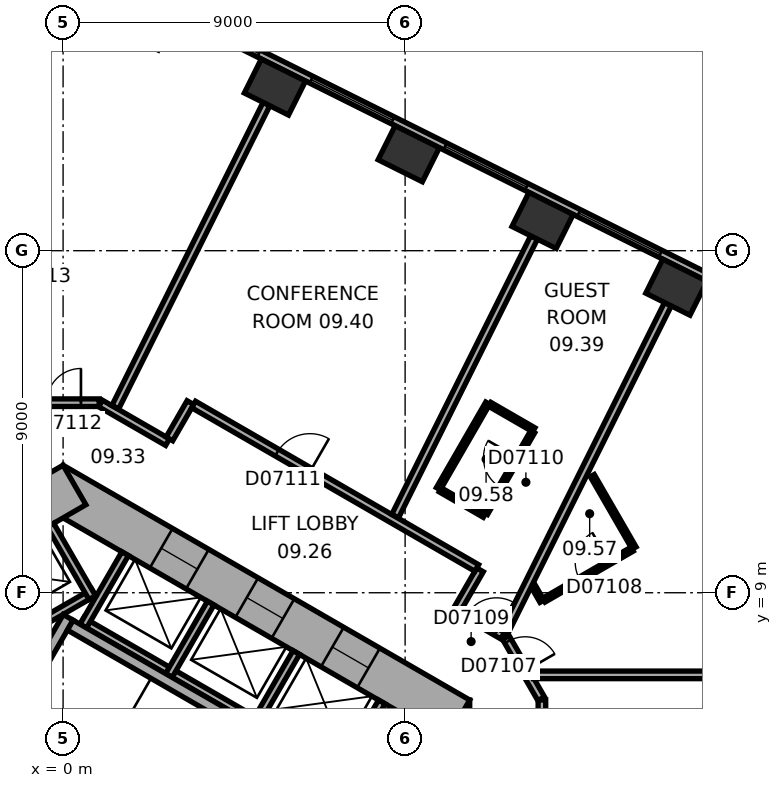
"""IFC4 building model, lengths in metres.
Left out: names, types, materials, properties, quantities, classifications, styles, units other than length and angle.
Written with IfcOpenShell. Run it as: python <this file> out.ifc"""

import sys

from ifc_helpers import new_model, si_unit, direction, frame, frame_2d, origin, origin_2d, place, context, subcontext, project, spatial, rectangle, extrude, element, fill, save


model = new_model("IFC4")
c1 = context("Model", 3, precision=1e-05, world=origin(), true_north=direction((0.0, 1.0)))
c2 = subcontext(c1, "Body", "Model", "MODEL_VIEW")
j1 = project(units=[si_unit("LENGTHUNIT", "METRE"), si_unit("PLANEANGLEUNIT", "RADIAN")], contexts=[c1])
p1 = place(None, origin())
s1 = spatial("IfcSite", under=j1, at=p1, CompositionType="ELEMENT")
p2 = place(p1, origin())
s2 = spatial("IfcBuilding", under=s1, at=p2, CompositionType="ELEMENT")
p3 = place(p2, frame((0.0, 0.0, 50.6)))
s3 = spatial("IfcBuildingStorey", under=s2, at=p3, CompositionType="ELEMENT", Elevation=50.6)
for number, where, z_axis, x_axis in (
    (1, (16.138, 17.04, 0.0), (0.0, 0.0, 1.0), (-0.895, 0.446, 0.0)),
    (2, (12.616, 18.795, 0.0), (0.0, 0.0, 1.0), (-0.895, 0.446, 0.0)),
    (3, (9.095, 20.551, 0.0), (0.0, 0.0, 1.0), (-0.895, 0.446, 0.0)),
    (4, (5.574, 22.306, 0.0), (0.0, 0.0, 1.0), (-0.895, 0.446, 0.0)),
):
    element("IfcColumn", number, at=place(p3, frame(where, z_axis=z_axis, x_axis=x_axis)), inside=s3, PredefinedType="COLUMN", context=c2, shape_type="SweptSolid", body=[
        extrude(rectangle(XDim=1.3, YDim=1.0, at=origin_2d()), origin(), (0.0, 0.0, 1.0), 3.3),
    ])
p4 = place(p3, frame((10.1, -6.177, 0.0), z_axis=(0.0, 0.0, 1.0), x_axis=(0.0, 1.0, 0.0)))
e5 = element("IfcWall", 5, at=p4, inside=s3, PredefinedType="SHEAR", context=c2, shape_type="SweptSolid", body=[
    extrude(rectangle(XDim=12.355, YDim=1.2, at=frame_2d((6.177, 0.0))), origin(), (0.0, 0.0, 1.0), 3.3),
])
p5 = place(p4, frame((6.378, 0.0, 0.0)))
e6 = element("IfcOpeningElement", 6, at=p5, cuts=e5, PredefinedType="OPENING", context=c2, shape_type="SweptSolid", body=[
    extrude(rectangle(XDim=1.5, YDim=2.1, at=frame_2d((0.75, 1.05))), frame((0.0, 0.61, 0.0), z_axis=(0.0, -1.0, 0.0), x_axis=(1.0, 0.0, 0.0)), (0.0, 0.0, 1.0), 1.22),
])
p6 = place(p4, frame((1.828, 0.0, 0.0)))
e7 = element("IfcOpeningElement", 7, at=p6, cuts=e5, PredefinedType="OPENING", context=c2, shape_type="SweptSolid", body=[
    extrude(rectangle(XDim=1.1, YDim=2.1, at=frame_2d((0.55, 1.05))), frame((0.0, 0.61, 0.0), z_axis=(0.0, -1.0, 0.0), x_axis=(1.0, 0.0, 0.0)), (0.0, 0.0, 1.0), 1.22),
])
p7 = place(p4, frame((4.427, 0.0, 0.0)))
e8 = element("IfcOpeningElement", 8, at=p7, cuts=e5, PredefinedType="OPENING", context=c2, shape_type="SweptSolid", body=[
    extrude(rectangle(XDim=1.1, YDim=2.1, at=frame_2d((0.55, 1.05))), frame((0.0, 0.61, 0.0), z_axis=(0.0, -1.0, 0.0), x_axis=(1.0, 0.0, 0.0)), (0.0, 0.0, 1.0), 1.22),
])
p8 = place(p3, frame((10.4, 5.658, 0.0), z_axis=(0.0, 0.0, 1.0), x_axis=(-0.866021384402, 0.500006961711, 0.0)))
e9 = element("IfcWall", 9, at=p8, inside=s3, PredefinedType="SHEAR", context=c2, shape_type="SweptSolid", body=[
    extrude(rectangle(XDim=12.355, YDim=1.2, at=frame_2d((6.178, 0.0))), origin(), (0.0, 0.0, 1.0), 3.3),
])
p9 = place(p8, frame((2.728, 0.0, 0.0)))
e10 = element("IfcOpeningElement", 10, at=p9, cuts=e9, PredefinedType="OPENING", context=c2, shape_type="SweptSolid", body=[
    extrude(rectangle(XDim=1.1, YDim=2.1, at=frame_2d((0.55, 1.05))), frame((0.0, 0.61, 0.0), z_axis=(0.0, -1.0, 0.0), x_axis=(1.0, 0.0, 0.0)), (0.0, 0.0, 1.0), 1.22),
])
p10 = place(p8, frame((5.328, 0.0, 0.0)))
e11 = element("IfcOpeningElement", 11, at=p10, cuts=e9, PredefinedType="OPENING", context=c2, shape_type="SweptSolid", body=[
    extrude(rectangle(XDim=1.1, YDim=2.1, at=frame_2d((0.55, 1.05))), frame((0.0, 0.61, 0.0), z_axis=(0.0, -1.0, 0.0), x_axis=(1.0, 0.0, 0.0)), (0.0, 0.0, 1.0), 1.22),
])
p11 = place(p8, frame((7.928, 0.0, 0.0)))
e12 = element("IfcOpeningElement", 12, at=p11, cuts=e9, PredefinedType="OPENING", context=c2, shape_type="SweptSolid", body=[
    extrude(rectangle(XDim=1.1, YDim=2.1, at=frame_2d((0.55, 1.05))), frame((0.0, 0.61, 0.0), z_axis=(0.0, -1.0, 0.0), x_axis=(1.0, 0.0, 0.0)), (0.0, 0.0, 1.0), 1.22),
])
p12 = place(p3, frame((0.3, 11.836, 0.0), z_axis=(0.0, 0.0, 1.0), x_axis=(-0.866021384402, -0.500006961711, 0.0)))
e13 = element("IfcWall", 13, at=p12, inside=s3, PredefinedType="SHEAR", context=c2, shape_type="SweptSolid", body=[
    extrude(rectangle(XDim=12.355, YDim=1.2, at=frame_2d((6.178, 0.0))), origin(), (0.0, 0.0, 1.0), 3.3),
])
p13 = place(p12, frame((6.378, 0.0, 0.0)))
e14 = element("IfcOpeningElement", 14, at=p13, cuts=e13, PredefinedType="OPENING", context=c2, shape_type="SweptSolid", body=[
    extrude(rectangle(XDim=1.5, YDim=2.1, at=frame_2d((0.75, 1.05))), frame((0.0, 0.61, 0.0), z_axis=(0.0, -1.0, 0.0), x_axis=(1.0, 0.0, 0.0)), (0.0, 0.0, 1.0), 1.22),
])
p14 = place(p12, frame((1.828, 0.0, 0.0)))
e15 = element("IfcOpeningElement", 15, at=p14, cuts=e13, PredefinedType="OPENING", context=c2, shape_type="SweptSolid", body=[
    extrude(rectangle(XDim=1.1, YDim=2.1, at=frame_2d((0.55, 1.05))), frame((0.0, 0.61, 0.0), z_axis=(0.0, -1.0, 0.0), x_axis=(1.0, 0.0, 0.0)), (0.0, 0.0, 1.0), 1.22),
])
p15 = place(p3, frame((20.63, 15.47, 0.0), z_axis=(0.0, 0.0, 1.0), x_axis=(-0.894934518609, 0.446197498203, 0.0)))
e16 = element("IfcWall", 16, at=p15, inside=s3, PredefinedType="STANDARD", context=c2, shape_type="SweptSolid", body=[
    extrude(rectangle(XDim=21.246, YDim=0.2, at=frame_2d((10.623, 0.0))), origin(), (0.0, 0.0, 1.0), 3.3),
])
p16 = place(p15, frame((1.553, 0.0, 0.8)))
e17 = element("IfcOpeningElement", 17, at=p16, cuts=e16, PredefinedType="OPENING", context=c2, shape_type="SweptSolid", body=[
    extrude(rectangle(XDim=2.4, YDim=1.7, at=frame_2d((1.2, 0.85))), frame((0.0, 0.11, 0.0), z_axis=(0.0, -1.0, 0.0), x_axis=(1.0, 0.0, 0.0)), (0.0, 0.0, 1.0), 0.22),
])
p17 = place(p15, frame((5.488, 0.0, 0.8)))
e18 = element("IfcOpeningElement", 18, at=p17, cuts=e16, PredefinedType="OPENING", context=c2, shape_type="SweptSolid", body=[
    extrude(rectangle(XDim=2.4, YDim=1.7, at=frame_2d((1.2, 0.85))), frame((0.0, 0.11, 0.0), z_axis=(0.0, -1.0, 0.0), x_axis=(1.0, 0.0, 0.0)), (0.0, 0.0, 1.0), 0.22),
])
p18 = place(p15, frame((9.422, 0.0, 0.8)))
e19 = element("IfcOpeningElement", 19, at=p18, cuts=e16, PredefinedType="OPENING", context=c2, shape_type="SweptSolid", body=[
    extrude(rectangle(XDim=2.4, YDim=1.7, at=frame_2d((1.2, 0.85))), frame((0.0, 0.11, 0.0), z_axis=(0.0, -1.0, 0.0), x_axis=(1.0, 0.0, 0.0)), (0.0, 0.0, 1.0), 0.22),
])
p19 = place(p15, frame((13.357, 0.0, 0.8)))
e20 = element("IfcOpeningElement", 20, at=p19, cuts=e16, PredefinedType="OPENING", context=c2, shape_type="SweptSolid", body=[
    extrude(rectangle(XDim=2.4, YDim=1.7, at=frame_2d((1.2, 0.85))), frame((0.0, 0.11, 0.0), z_axis=(0.0, -1.0, 0.0), x_axis=(1.0, 0.0, 0.0)), (0.0, 0.0, 1.0), 0.22),
])
p20 = place(p15, frame((17.292, 0.0, 0.8)))
e21 = element("IfcOpeningElement", 21, at=p20, cuts=e16, PredefinedType="OPENING", context=c2, shape_type="SweptSolid", body=[
    extrude(rectangle(XDim=2.4, YDim=1.7, at=frame_2d((1.2, 0.85))), frame((0.0, 0.11, 0.0), z_axis=(0.0, -1.0, 0.0), x_axis=(1.0, 0.0, 0.0)), (0.0, 0.0, 1.0), 0.22),
])
p21 = place(p3, frame((7.424, 4.259, 0.0), z_axis=(0.0, 0.0, 1.0), x_axis=(-0.866026010844, 0.49999894854, 0.0)))
e22 = element("IfcWall", 22, at=p21, inside=s3, PredefinedType="PARTITIONING", context=c2, shape_type="SweptSolid", body=[
    extrude(rectangle(XDim=8.0, YDim=0.2, at=frame_2d((4.0, 0.0))), origin(), (0.0, 0.0, 1.0), 3.05),
])
for number, where, z_axis, x_axis in (
    (23, (7.287, 4.222, 0.0), (0.0, 0.0, 1.0), (0.5, 0.866, 0.0)),
    (24, (5.036, 5.522, 0.0), (0.0, 0.0, 1.0), (0.5, 0.866, 0.0)),
    (25, (2.784, 6.822, 0.0), (0.0, 0.0, 1.0), (0.5, 0.866, 0.0)),
    (26, (0.532, 8.122, 0.0), (0.0, 0.0, 1.0), (0.5, 0.866, 0.0)),
):
    element("IfcWall", number, at=place(p3, frame(where, z_axis=z_axis, x_axis=x_axis)), inside=s3, PredefinedType="PARTITIONING", context=c2, shape_type="SweptSolid", body=[
        extrude(rectangle(XDim=2.2, YDim=0.2, at=frame_2d((1.1, 0.0))), origin(), (0.0, 0.0, 1.0), 3.05),
    ])
p22 = place(p3, frame((0.803, 9.009, 0.0), z_axis=(0.0, 0.0, 1.0), x_axis=(-0.866028230842, -0.499995103361, 0.0)))
e27 = element("IfcWall", 27, at=p22, inside=s3, PredefinedType="PARTITIONING", context=c2, shape_type="SweptSolid", body=[
    extrude(rectangle(XDim=5.4, YDim=0.2, at=frame_2d((2.7, 0.0))), origin(), (0.0, 0.0, 1.0), 3.05),
])
p23 = place(p3, frame((0.767, 8.872, 0.0), z_axis=(0.0, 0.0, 1.0), x_axis=(-0.499994660107, 0.866028486751, 0.0)))
e28 = element("IfcWall", 28, at=p23, inside=s3, PredefinedType="PARTITIONING", context=c2, shape_type="SweptSolid", body=[
    extrude(rectangle(XDim=2.2, YDim=0.2, at=frame_2d((1.1, 0.0))), origin(), (0.0, 0.0, 1.0), 3.05),
])
p24 = place(p3, frame((-2.216, 4.282, 0.0), z_axis=(0.0, 0.0, 1.0), x_axis=(0.499977259774, 0.866038532462, 0.0)))
e29 = element("IfcWall", 29, at=p24, inside=s3, PredefinedType="SHEAR", context=c2, shape_type="SweptSolid", body=[
    extrude(rectangle(XDim=4.7, YDim=0.3, at=frame_2d((2.35, 0.0))), origin(), (0.0, 0.0, 1.0), 3.05),
])
p25 = place(p3, frame((6.303, 4.617, 0.0), z_axis=(0.0, 0.0, 1.0), x_axis=(-0.866027801685, 0.499995846692, 0.0)))
e30 = element("IfcWall", 30, at=p25, inside=s3, PredefinedType="SHEAR", context=c2, shape_type="SweptSolid", body=[
    extrude(rectangle(XDim=7.06, YDim=0.3, at=frame_2d((3.53, 0.0))), origin(), (0.0, 0.0, 1.0), 3.05),
])
p26 = place(p3, frame((0.95, 14.001, 0.0), z_axis=(0.0, 0.0, 1.0), x_axis=(-1.0, 0.0, 0.0)))
e31 = element("IfcWall", 31, at=p26, inside=s3, PredefinedType="PARTITIONING", context=c2, shape_type="SweptSolid", body=[
    extrude(rectangle(XDim=1.86, YDim=0.2, at=frame_2d((0.93, 0.0))), origin(), (0.0, 0.0, 1.0), 3.05),
])
p27 = place(p26, frame((0.48, 0.0, 0.0)))
e32 = element("IfcOpeningElement", 32, at=p27, cuts=e31, PredefinedType="OPENING", context=c2, shape_type="SweptSolid", body=[
    extrude(rectangle(XDim=0.9, YDim=2.1, at=frame_2d((0.45, 1.05))), frame((0.0, 0.11, 0.0), z_axis=(0.0, -1.0, 0.0), x_axis=(1.0, 0.0, 0.0)), (0.0, 0.0, 1.0), 0.22),
])
p28 = place(p3, frame((2.748, 12.962, 0.0), z_axis=(0.0, 0.0, 1.0), x_axis=(-0.866013897511, 0.50001992892, 0.0)))
e33 = element("IfcWall", 33, at=p28, inside=s3, PredefinedType="PARTITIONING", context=c2, shape_type="SweptSolid", body=[
    extrude(rectangle(XDim=2.037, YDim=0.2, at=frame_2d((1.018, 0.0))), origin(), (0.0, 0.0, 1.0), 3.05),
])
p29 = place(p3, frame((3.349, 14.002, 0.0), z_axis=(0.0, 0.0, 1.0), x_axis=(-0.500074377092, -0.865982457891, 0.0)))
e34 = element("IfcWall", 34, at=p29, inside=s3, PredefinedType="PARTITIONING", context=c2, shape_type="SweptSolid", body=[
    extrude(rectangle(XDim=1.101, YDim=0.2, at=frame_2d((0.55, 0.0))), origin(), (0.0, 0.0, 1.0), 3.05),
])
p30 = place(p3, frame((5.351, 21.859, 0.0), z_axis=(0.0, 0.0, 1.0), x_axis=(-0.446205309328, -0.894930624086, 0.0)))
e35 = element("IfcWall", 35, at=p30, inside=s3, PredefinedType="PARTITIONING", context=c2, shape_type="SweptSolid", body=[
    extrude(rectangle(XDim=8.913, YDim=0.2, at=frame_2d((4.457, 0.0))), origin(), (0.0, 0.0, 1.0), 2.6),
])
p31 = place(p3, frame((9.875, 11.736, 0.0), z_axis=(0.0, 0.0, 1.0), x_axis=(0.499936506574, 0.866062058628, 0.0)))
e36 = element("IfcWall", 36, at=p31, inside=s3, PredefinedType="PARTITIONING", context=c2, shape_type="SweptSolid", body=[
    extrude(rectangle(XDim=2.6, YDim=0.12, at=frame_2d((1.3, 0.0))), origin(), (0.0, 0.0, 1.0), 3.05),
])
p32 = place(p3, frame((10.371, 8.561, 0.0), z_axis=(0.0, 0.0, 1.0), x_axis=(0.499986357472, 0.866033280158, 0.0)))
e37 = element("IfcWall", 37, at=p32, inside=s3, PredefinedType="PARTITIONING", context=c2, shape_type="SweptSolid", body=[
    extrude(rectangle(XDim=1.201, YDim=0.2, at=frame_2d((0.601, 0.0))), origin(), (0.0, 0.0, 1.0), 3.05),
])
p33 = place(p3, frame((10.885, 9.652, 0.0), z_axis=(0.0, 0.0, 1.0), x_axis=(-0.866033868542, 0.499985338323, 0.0)))
e38 = element("IfcWall", 38, at=p33, inside=s3, PredefinedType="PARTITIONING", context=c2, shape_type="SweptSolid", body=[
    extrude(rectangle(XDim=8.602, YDim=0.2, at=frame_2d((4.301, 0.0))), origin(), (0.0, 0.0, 1.0), 3.05),
])
p34 = place(p33, frame((5.069, 0.0, 0.0)))
e39 = element("IfcOpeningElement", 39, at=p34, cuts=e38, PredefinedType="OPENING", context=c2, shape_type="SweptSolid", body=[
    extrude(rectangle(XDim=1.0, YDim=2.1, at=frame_2d((0.5, 1.05))), frame((0.0, 0.11, 0.0), z_axis=(0.0, -1.0, 0.0), x_axis=(1.0, 0.0, 0.0)), (0.0, 0.0, 1.0), 0.22),
])
for number, where, z_axis, x_axis in (
    (40, (11.087, 11.036, 0.0), (0.0, 0.0, 1.0), (-0.866, 0.5, 0.0)),
    (41, (11.226, 13.958, 0.0), (0.0, 0.0, 1.0), (0.866, -0.5, 0.0)),
):
    element("IfcWall", number, at=place(p3, frame(where, z_axis=z_axis, x_axis=x_axis)), inside=s3, PredefinedType="PARTITIONING", context=c2, shape_type="SweptSolid", body=[
        extrude(rectangle(XDim=1.34, YDim=0.12, at=frame_2d((0.67, 0.0))), origin(), (0.0, 0.0, 1.0), 3.05),
    ])
p35 = place(p3, frame((11.566, 7.871, 0.0), z_axis=(0.0, 0.0, 1.0), x_axis=(-0.866004557827, 0.500036104519, 0.0)))
e42 = element("IfcWall", 42, at=p35, inside=s3, PredefinedType="PARTITIONING", context=c2, shape_type="SweptSolid", body=[
    extrude(rectangle(XDim=1.28, YDim=0.2, at=frame_2d((0.64, 0.0))), origin(), (0.0, 0.0, 1.0), 3.05),
])
p36 = place(p35, frame((0.19, 0.0, 0.0)))
e43 = element("IfcOpeningElement", 43, at=p36, cuts=e42, PredefinedType="OPENING", context=c2, shape_type="SweptSolid", body=[
    extrude(rectangle(XDim=0.9, YDim=2.1, at=frame_2d((0.45, 1.05))), frame((0.0, 0.11, 0.0), z_axis=(0.0, -1.0, 0.0), x_axis=(1.0, 0.0, 0.0)), (0.0, 0.0, 1.0), 0.22),
])
p37 = place(p3, frame((12.357, 13.236, 0.0), z_axis=(0.0, 0.0, 1.0), x_axis=(-0.50000366821, -0.866023285932, 0.0)))
e44 = element("IfcWall", 44, at=p37, inside=s3, PredefinedType="PARTITIONING", context=c2, shape_type="SweptSolid", body=[
    extrude(rectangle(XDim=2.48, YDim=0.12, at=frame_2d((1.24, 0.0))), origin(), (0.0, 0.0, 1.0), 3.05),
])
p38 = place(p37, frame((0.79, 0.0, 0.0)))
e45 = element("IfcOpeningElement", 45, at=p38, cuts=e44, PredefinedType="OPENING", context=c2, shape_type="SweptSolid", body=[
    extrude(rectangle(XDim=0.9, YDim=2.1, at=frame_2d((0.45, 1.05))), frame((0.0, 0.07, 0.0), z_axis=(0.0, -1.0, 0.0), x_axis=(1.0, 0.0, 0.0)), (0.0, 0.0, 1.0), 0.14),
])
p39 = place(p3, frame((12.393, 18.348, 0.0), z_axis=(0.0, 0.0, 1.0), x_axis=(-0.446176022699, -0.894945225569, 0.0)))
e46 = element("IfcWall", 46, at=p39, inside=s3, PredefinedType="PARTITIONING", context=c2, shape_type="SweptSolid", body=[
    extrude(rectangle(XDim=8.191, YDim=0.2, at=frame_2d((4.095, 0.0))), origin(), (0.0, 0.0, 1.0), 2.6),
])
p40 = place(p3, frame((12.58, 6.212, 0.0), z_axis=(0.0, 0.0, 1.0), x_axis=(-0.500063286585, 0.865988862174, 0.0)))
e47 = element("IfcWall", 47, at=p40, inside=s3, PredefinedType="PARTITIONING", context=c2, shape_type="SweptSolid", body=[
    extrude(rectangle(XDim=1.86, YDim=0.2, at=frame_2d((0.93, 0.0))), origin(), (0.0, 0.0, 1.0), 3.05),
])
p41 = place(p40, frame((0.842, 0.0, 0.0)))
e48 = element("IfcOpeningElement", 48, at=p41, cuts=e47, PredefinedType="OPENING", context=c2, shape_type="SweptSolid", body=[
    extrude(rectangle(XDim=0.9, YDim=2.1, at=frame_2d((0.45, 1.05))), frame((0.0, 0.11, 0.0), z_axis=(0.0, -1.0, 0.0), x_axis=(1.0, 0.0, 0.0)), (0.0, 0.0, 1.0), 0.22),
])
p42 = place(p3, frame((12.6, 3.004, 0.0), z_axis=(0.0, 0.0, 1.0), x_axis=(0.0, 1.0, 0.0)))
e49 = element("IfcWall", 49, at=p42, inside=s3, PredefinedType="PARTITIONING", context=c2, shape_type="SweptSolid", body=[
    extrude(rectangle(XDim=3.173, YDim=0.2, at=frame_2d((1.586, 0.0))), origin(), (0.0, 0.0, 1.0), 3.05),
])
p43 = place(p42, frame((1.998, 0.0, 0.0)))
e50 = element("IfcOpeningElement", 50, at=p43, cuts=e49, PredefinedType="OPENING", context=c2, shape_type="SweptSolid", body=[
    extrude(rectangle(XDim=0.9, YDim=2.1, at=frame_2d((0.45, 1.05))), frame((0.0, 0.11, 0.0), z_axis=(0.0, -1.0, 0.0), x_axis=(1.0, 0.0, 0.0)), (0.0, 0.0, 1.0), 0.22),
])
p44 = place(p3, frame((12.601, 8.776, 0.0), z_axis=(0.0, 0.0, 1.0), x_axis=(-0.500166486798, 0.865929261247, 0.0)))
e51 = element("IfcWall", 51, at=p44, inside=s3, PredefinedType="PARTITIONING", context=c2, shape_type="SweptSolid", body=[
    extrude(rectangle(XDim=0.476, YDim=0.12, at=frame_2d((0.238, 0.0))), origin(), (0.0, 0.0, 1.0), 3.05),
])
p45 = place(p3, frame((13.926, 12.081, 0.0), z_axis=(0.0, 0.0, 1.0), x_axis=(0.499994660107, -0.866028486751, 0.0)))
e52 = element("IfcWall", 52, at=p45, inside=s3, PredefinedType="PARTITIONING", context=c2, shape_type="SweptSolid", body=[
    extrude(rectangle(XDim=2.2, YDim=0.12, at=frame_2d((1.1, 0.0))), origin(), (0.0, 0.0, 1.0), 3.05),
])
p46 = place(p3, frame((14.974, 10.146, 0.0), z_axis=(0.0, 0.0, 1.0), x_axis=(-0.86599746015, -0.500048396672, 0.0)))
e53 = element("IfcWall", 53, at=p46, inside=s3, PredefinedType="PARTITIONING", context=c2, shape_type="SweptSolid", body=[
    extrude(rectangle(XDim=2.68, YDim=0.12, at=frame_2d((1.34, 0.0))), origin(), (0.0, 0.0, 1.0), 3.05),
])
p47 = place(p46, frame((0.69, 0.0, 0.0)))
e54 = element("IfcOpeningElement", 54, at=p47, cuts=e53, PredefinedType="OPENING", context=c2, shape_type="SweptSolid", body=[
    extrude(rectangle(XDim=0.9, YDim=2.1, at=frame_2d((0.45, 1.05))), frame((0.0, 0.07, 0.0), z_axis=(0.0, -1.0, 0.0), x_axis=(1.0, 0.0, 0.0)), (0.0, 0.0, 1.0), 0.14),
])
p48 = place(p3, frame((15.915, 16.592, 0.0), z_axis=(0.0, 0.0, 1.0), x_axis=(-0.446199736347, -0.894933402709, 0.0)))
e55 = element("IfcWall", 55, at=p48, inside=s3, PredefinedType="PARTITIONING", context=c2, shape_type="SweptSolid", body=[
    extrude(rectangle(XDim=9.635, YDim=0.2, at=frame_2d((4.817, 0.0))), origin(), (0.0, 0.0, 1.0), 3.05),
])
p49 = place(p3, frame((21.95, 6.839, 0.0), z_axis=(0.0, 0.0, 1.0), x_axis=(-1.0, 0.0, 0.0)))
e56 = element("IfcWall", 56, at=p49, inside=s3, PredefinedType="PARTITIONING", context=c2, shape_type="SweptSolid", body=[
    extrude(rectangle(XDim=9.572, YDim=0.2, at=frame_2d((4.786, 0.0))), origin(), (0.0, 0.0, 1.0), 3.05),
])
p50 = place(p17, origin())
e57 = element("IfcWindow", 57, at=p50, inside=s3, PartitioningType="SINGLE_PANEL", PredefinedType="WINDOW", context=c2, shape_type="SweptSolid", body=[
    extrude(rectangle(XDim=2.4, YDim=1.7, at=frame_2d((1.2, 0.85))), frame((0.0, 0.03, 0.0), z_axis=(0.0, -1.0, 0.0), x_axis=(1.0, 0.0, 0.0)), (0.0, 0.0, 1.0), 0.06),
])
fill(e18, e57)
p51 = place(p18, origin())
e58 = element("IfcWindow", 58, at=p51, inside=s3, PartitioningType="SINGLE_PANEL", PredefinedType="WINDOW", context=c2, shape_type="SweptSolid", body=[
    extrude(rectangle(XDim=2.4, YDim=1.7, at=frame_2d((1.2, 0.85))), frame((0.0, 0.03, 0.0), z_axis=(0.0, -1.0, 0.0), x_axis=(1.0, 0.0, 0.0)), (0.0, 0.0, 1.0), 0.06),
])
fill(e19, e58)
p52 = place(p19, origin())
e59 = element("IfcWindow", 59, at=p52, inside=s3, PartitioningType="SINGLE_PANEL", PredefinedType="WINDOW", context=c2, shape_type="SweptSolid", body=[
    extrude(rectangle(XDim=2.4, YDim=1.7, at=frame_2d((1.2, 0.85))), frame((0.0, 0.03, 0.0), z_axis=(0.0, -1.0, 0.0), x_axis=(1.0, 0.0, 0.0)), (0.0, 0.0, 1.0), 0.06),
])
fill(e20, e59)
p53 = place(p20, origin())
e60 = element("IfcWindow", 60, at=p53, inside=s3, PartitioningType="SINGLE_PANEL", PredefinedType="WINDOW", context=c2, shape_type="SweptSolid", body=[
    extrude(rectangle(XDim=2.4, YDim=1.7, at=frame_2d((1.2, 0.85))), frame((0.0, 0.03, 0.0), z_axis=(0.0, -1.0, 0.0), x_axis=(1.0, 0.0, 0.0)), (0.0, 0.0, 1.0), 0.06),
])
fill(e21, e60)
p54 = place(p9, origin())
e61 = element("IfcDoor", 61, at=p54, inside=s3, OperationType="DOUBLE_DOOR_SLIDING", PredefinedType="DOOR", context=c2, shape_type="SweptSolid", body=[
    extrude(rectangle(XDim=1.1, YDim=2.1, at=frame_2d((0.55, 1.05))), frame((0.0, 0.025, 0.0), z_axis=(0.0, -1.0, 0.0), x_axis=(1.0, 0.0, 0.0)), (0.0, 0.0, 1.0), 0.05),
])
fill(e10, e61)
p55 = place(p10, origin())
e62 = element("IfcDoor", 62, at=p55, inside=s3, OperationType="DOUBLE_DOOR_SLIDING", PredefinedType="DOOR", context=c2, shape_type="SweptSolid", body=[
    extrude(rectangle(XDim=1.1, YDim=2.1, at=frame_2d((0.55, 1.05))), frame((0.0, 0.025, 0.0), z_axis=(0.0, -1.0, 0.0), x_axis=(1.0, 0.0, 0.0)), (0.0, 0.0, 1.0), 0.05),
])
fill(e11, e62)
p56 = place(p11, origin())
e63 = element("IfcDoor", 63, at=p56, inside=s3, OperationType="DOUBLE_DOOR_SLIDING", PredefinedType="DOOR", context=c2, shape_type="SweptSolid", body=[
    extrude(rectangle(XDim=1.1, YDim=2.1, at=frame_2d((0.55, 1.05))), frame((0.0, 0.025, 0.0), z_axis=(0.0, -1.0, 0.0), x_axis=(1.0, 0.0, 0.0)), (0.0, 0.0, 1.0), 0.05),
])
fill(e12, e63)
p57 = place(p41, origin())
e64 = element("IfcDoor", 64, at=p57, inside=s3, OperationType="SINGLE_SWING_LEFT", PredefinedType="DOOR", context=c2, shape_type="SweptSolid", body=[
    extrude(rectangle(XDim=0.9, YDim=2.1, at=frame_2d((0.45, 1.05))), frame((0.0, 0.025, 0.0), z_axis=(0.0, -1.0, 0.0), x_axis=(1.0, 0.0, 0.0)), (0.0, 0.0, 1.0), 0.05),
])
fill(e48, e64)
p58 = place(p47, origin())
e65 = element("IfcDoor", 65, at=p58, inside=s3, OperationType="SINGLE_SWING_LEFT", PredefinedType="DOOR", context=c2, shape_type="SweptSolid", body=[
    extrude(rectangle(XDim=0.9, YDim=2.1, at=frame_2d((0.45, 1.05))), frame((0.0, 0.025, 0.0), z_axis=(0.0, -1.0, 0.0), x_axis=(1.0, 0.0, 0.0)), (0.0, 0.0, 1.0), 0.05),
])
fill(e54, e65)
p59 = place(p36, origin())
e66 = element("IfcDoor", 66, at=p59, inside=s3, OperationType="SINGLE_SWING_LEFT", PredefinedType="DOOR", context=c2, shape_type="SweptSolid", body=[
    extrude(rectangle(XDim=0.9, YDim=2.1, at=frame_2d((0.45, 1.05))), frame((0.0, 0.025, 0.0), z_axis=(0.0, -1.0, 0.0), x_axis=(1.0, 0.0, 0.0)), (0.0, 0.0, 1.0), 0.05),
])
fill(e43, e66)
p60 = place(p38, origin())
e67 = element("IfcDoor", 67, at=p60, inside=s3, OperationType="SINGLE_SWING_LEFT", PredefinedType="DOOR", context=c2, shape_type="SweptSolid", body=[
    extrude(rectangle(XDim=0.9, YDim=2.1, at=frame_2d((0.45, 1.05))), frame((0.0, 0.025, 0.0), z_axis=(0.0, -1.0, 0.0), x_axis=(1.0, 0.0, 0.0)), (0.0, 0.0, 1.0), 0.05),
])
fill(e45, e67)
p61 = place(p34, origin())
e68 = element("IfcDoor", 68, at=p61, inside=s3, OperationType="SINGLE_SWING_LEFT", PredefinedType="DOOR", context=c2, shape_type="SweptSolid", body=[
    extrude(rectangle(XDim=1.0, YDim=2.1, at=frame_2d((0.5, 1.05))), frame((0.0, 0.025, 0.0), z_axis=(0.0, -1.0, 0.0), x_axis=(1.0, 0.0, 0.0)), (0.0, 0.0, 1.0), 0.05),
])
fill(e39, e68)
p62 = place(p27, origin())
e69 = element("IfcDoor", 69, at=p62, inside=s3, OperationType="SINGLE_SWING_LEFT", PredefinedType="DOOR", context=c2, shape_type="SweptSolid", body=[
    extrude(rectangle(XDim=0.9, YDim=2.1, at=frame_2d((0.45, 1.05))), frame((0.0, 0.025, 0.0), z_axis=(0.0, -1.0, 0.0), x_axis=(1.0, 0.0, 0.0)), (0.0, 0.0, 1.0), 0.05),
])
fill(e32, e69)
save(model, sys.argv[1])
